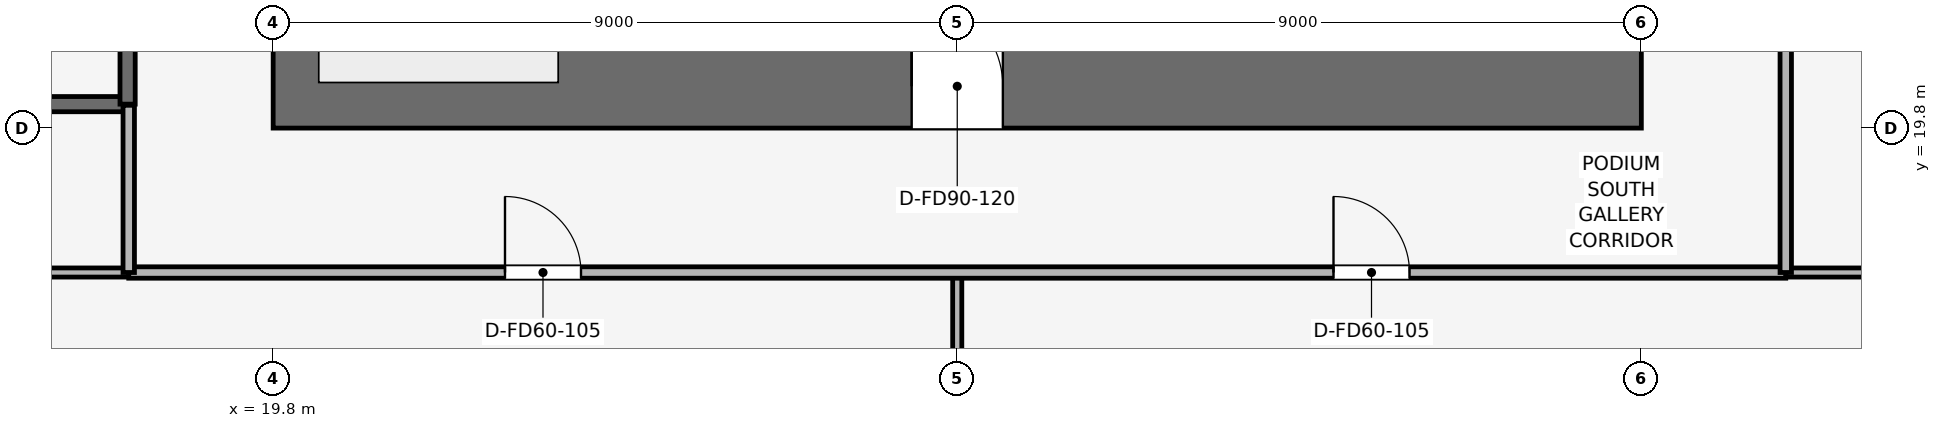
"""IFC4 building model, lengths in metres.
Left out: names, types, materials, properties, quantities, classifications, styles, units other than length and angle.
Written with IfcOpenShell. Run it as: python <this file> out.ifc"""

import sys

from ifc_helpers import new_model, si_unit, direction, frame, frame_2d, origin, place, context, subcontext, project, spatial, rectangle, extrude, element, fill, save


model = new_model("IFC4")
c1 = context("Model", 3, precision=1e-05, world=origin(), true_north=direction((0.0, 1.0)))
c2 = subcontext(c1, "Body", "Model", "MODEL_VIEW")
j1 = project(units=[si_unit("LENGTHUNIT", "METRE"), si_unit("PLANEANGLEUNIT", "RADIAN")], contexts=[c1])
p1 = place(None, origin())
s1 = spatial("IfcSite", under=j1, at=p1, CompositionType="ELEMENT")
p2 = place(p1, origin())
s2 = spatial("IfcBuilding", under=s1, at=p2, CompositionType="ELEMENT")
p3 = place(p2, frame((0.0, 0.0, 8.4)))
s3 = spatial("IfcBuildingStorey", under=s2, at=p3, CompositionType="ELEMENT", Elevation=8.4)
p4 = place(p3, frame((19.8, 20.35, 0.0), z_axis=(0.0, 0.0, 1.0), x_axis=(1.0, 0.0, 0.0)))
e1 = element("IfcWall", 1, at=p4, inside=s3, PredefinedType="SHEAR", context=c2, shape_type="SweptSolid", body=[
    extrude(rectangle(XDim=18.0, YDim=1.1, at=frame_2d((9.0, 0.0))), origin(), (0.0, 0.0, 1.0), 5.4),
])
p5 = place(p4, frame((8.4, 0.0, 0.0)))
e2 = element("IfcOpeningElement", 2, at=p5, cuts=e1, PredefinedType="OPENING", context=c2, shape_type="SweptSolid", body=[
    extrude(rectangle(XDim=1.2, YDim=2.2, at=frame_2d((0.6, 1.1))), frame((0.0, 0.56, 0.0), z_axis=(0.0, -1.0, 0.0), x_axis=(1.0, 0.0, 0.0)), (0.0, 0.0, 1.0), 1.12),
])
p6 = place(p3, frame((9.315, 20.115, 0.0), z_axis=(0.0, 0.0, 1.0), x_axis=(1.0, 0.0, 0.0)))
e3 = element("IfcWall", 3, at=p6, inside=s3, PredefinedType="SHEAR", context=c2, shape_type="SweptSolid", body=[
    extrude(rectangle(XDim=8.57, YDim=0.2, at=frame_2d((4.285, 0.0))), origin(), (0.0, 0.0, 1.0), 5.398),
])
p7 = place(p3, frame((17.885, 20.115, 0.0), z_axis=(0.0, 0.0, 1.0), x_axis=(0.0, 1.0, 0.0)))
e4 = element("IfcWall", 4, at=p7, inside=s3, PredefinedType="SHEAR", context=c2, shape_type="SweptSolid", body=[
    extrude(rectangle(XDim=3.32, YDim=0.2, at=frame_2d((1.66, 0.0))), origin(), (0.0, 0.0, 1.0), 5.398),
])
p8 = place(p7, frame((0.9, 0.0, 0.0)))
e5 = element("IfcOpeningElement", 5, at=p8, cuts=e4, PredefinedType="OPENING", context=c2, shape_type="SweptSolid", body=[
    extrude(rectangle(XDim=1.1, YDim=2.15, at=frame_2d((0.55, 1.075))), frame((0.0, 0.11, 0.0), z_axis=(0.0, -1.0, 0.0), x_axis=(1.0, 0.0, 0.0)), (0.0, 0.0, 1.0), 0.22),
])
p9 = place(p3, frame((28.8, 0.85, 0.0), z_axis=(0.0, 0.0, 1.0), x_axis=(0.0, 1.0, 0.0)))
e6 = element("IfcWall", 6, at=p9, inside=s3, PredefinedType="PARTITIONING", context=c2, shape_type="SweptSolid", body=[
    extrude(rectangle(XDim=17.05, YDim=0.12, at=frame_2d((8.525, 0.0))), origin(), (0.0, 0.0, 1.0), 4.035),
])
p10 = place(p3, frame((8.6, 17.9, 0.0), z_axis=(0.0, 0.0, 1.0), x_axis=(1.0, 0.0, 0.0)))
e7 = element("IfcWall", 7, at=p10, inside=s3, PredefinedType="PARTITIONING", context=c2, shape_type="SweptSolid", body=[
    extrude(rectangle(XDim=9.3, YDim=0.12, at=frame_2d((4.65, 0.0))), origin(), (0.0, 0.0, 1.0), 5.05),
])
p11 = place(p3, frame((39.7, 17.9, 0.0), z_axis=(0.0, 0.0, 1.0), x_axis=(1.0, 0.0, 0.0)))
e8 = element("IfcWall", 8, at=p11, inside=s3, PredefinedType="PARTITIONING", context=c2, shape_type="SweptSolid", body=[
    extrude(rectangle(XDim=17.05, YDim=0.12, at=frame_2d((8.525, 0.0))), origin(), (0.0, 0.0, 1.0), 4.035),
])
p12 = place(p3, frame((17.9, 17.9, 0.0), z_axis=(0.0, 0.0, 1.0), x_axis=(1.0, 0.0, 0.0)))
e9 = element("IfcWall", 9, at=p12, inside=s3, PredefinedType="PARTITIONING", context=c2, shape_type="SweptSolid", body=[
    extrude(rectangle(XDim=21.8, YDim=0.15, at=frame_2d((10.9, 0.0))), origin(), (0.0, 0.0, 1.0), 4.135),
])
p13 = place(p12, frame((4.95, 0.0, 0.0)))
e10 = element("IfcOpeningElement", 10, at=p13, cuts=e9, PredefinedType="OPENING", context=c2, shape_type="SweptSolid", body=[
    extrude(rectangle(XDim=1.0, YDim=2.15, at=frame_2d((0.5, 1.075))), frame((0.0, 0.085, 0.0), z_axis=(0.0, -1.0, 0.0), x_axis=(1.0, 0.0, 0.0)), (0.0, 0.0, 1.0), 0.17),
])
p14 = place(p12, frame((15.85, 0.0, 0.0)))
e11 = element("IfcOpeningElement", 11, at=p14, cuts=e9, PredefinedType="OPENING", context=c2, shape_type="SweptSolid", body=[
    extrude(rectangle(XDim=1.0, YDim=2.15, at=frame_2d((0.5, 1.075))), frame((0.0, 0.085, 0.0), z_axis=(0.0, -1.0, 0.0), x_axis=(1.0, 0.0, 0.0)), (0.0, 0.0, 1.0), 0.17),
])
p15 = place(p3, frame((17.9, 17.9, 0.0), z_axis=(0.0, 0.0, 1.0), x_axis=(0.0, 1.0, 0.0)))
e12 = element("IfcWall", 12, at=p15, inside=s3, PredefinedType="PARTITIONING", context=c2, shape_type="SweptSolid", body=[
    extrude(rectangle(XDim=2.2, YDim=0.15, at=frame_2d((1.1, 0.0))), origin(), (0.0, 0.0, 1.0), 5.05),
])
p16 = place(p3, frame((39.7, 17.9, 0.0), z_axis=(0.0, 0.0, 1.0), x_axis=(0.0, 1.0, 0.0)))
e13 = element("IfcWall", 13, at=p16, inside=s3, PredefinedType="PARTITIONING", context=c2, shape_type="SweptSolid", body=[
    extrude(rectangle(XDim=16.25, YDim=0.15, at=frame_2d((8.125, 0.0))), origin(), (0.0, 0.0, 1.0), 4.135),
])
p17 = place(p16, frame((4.05, 0.0, 0.0)))
e14 = element("IfcOpeningElement", 14, at=p17, cuts=e13, PredefinedType="OPENING", context=c2, shape_type="SweptSolid", body=[
    extrude(rectangle(XDim=1.0, YDim=2.15, at=frame_2d((0.5, 1.075))), frame((0.0, 0.085, 0.0), z_axis=(0.0, -1.0, 0.0), x_axis=(1.0, 0.0, 0.0)), (0.0, 0.0, 1.0), 0.17),
])
p18 = place(p16, frame((12.175, 0.0, 0.0)))
e15 = element("IfcOpeningElement", 15, at=p18, cuts=e13, PredefinedType="OPENING", context=c2, shape_type="SweptSolid", body=[
    extrude(rectangle(XDim=1.0, YDim=2.15, at=frame_2d((0.5, 1.075))), frame((0.0, 0.085, 0.0), z_axis=(0.0, -1.0, 0.0), x_axis=(1.0, 0.0, 0.0)), (0.0, 0.0, 1.0), 0.17),
])
p19 = place(p13, origin())
e16 = element("IfcDoor", 16, at=p19, inside=s3, OperationType="SINGLE_SWING_LEFT", PredefinedType="DOOR", context=c2, shape_type="SweptSolid", body=[
    extrude(rectangle(XDim=1.0, YDim=2.15, at=frame_2d((0.5, 1.075))), frame((0.0, 0.025, 0.0), z_axis=(0.0, -1.0, 0.0), x_axis=(1.0, 0.0, 0.0)), (0.0, 0.0, 1.0), 0.05),
])
fill(e10, e16)
p20 = place(p14, origin())
e17 = element("IfcDoor", 17, at=p20, inside=s3, OperationType="SINGLE_SWING_LEFT", PredefinedType="DOOR", context=c2, shape_type="SweptSolid", body=[
    extrude(rectangle(XDim=1.0, YDim=2.15, at=frame_2d((0.5, 1.075))), frame((0.0, 0.025, 0.0), z_axis=(0.0, -1.0, 0.0), x_axis=(1.0, 0.0, 0.0)), (0.0, 0.0, 1.0), 0.05),
])
fill(e11, e17)
p21 = place(p5, origin())
e18 = element("IfcDoor", 18, at=p21, inside=s3, OperationType="SINGLE_SWING_LEFT", PredefinedType="DOOR", context=c2, shape_type="SweptSolid", body=[
    extrude(rectangle(XDim=1.2, YDim=2.2, at=frame_2d((0.6, 1.1))), frame((0.0, 0.025, 0.0), z_axis=(0.0, -1.0, 0.0), x_axis=(1.0, 0.0, 0.0)), (0.0, 0.0, 1.0), 0.05),
])
fill(e2, e18)
save(model, sys.argv[1])
